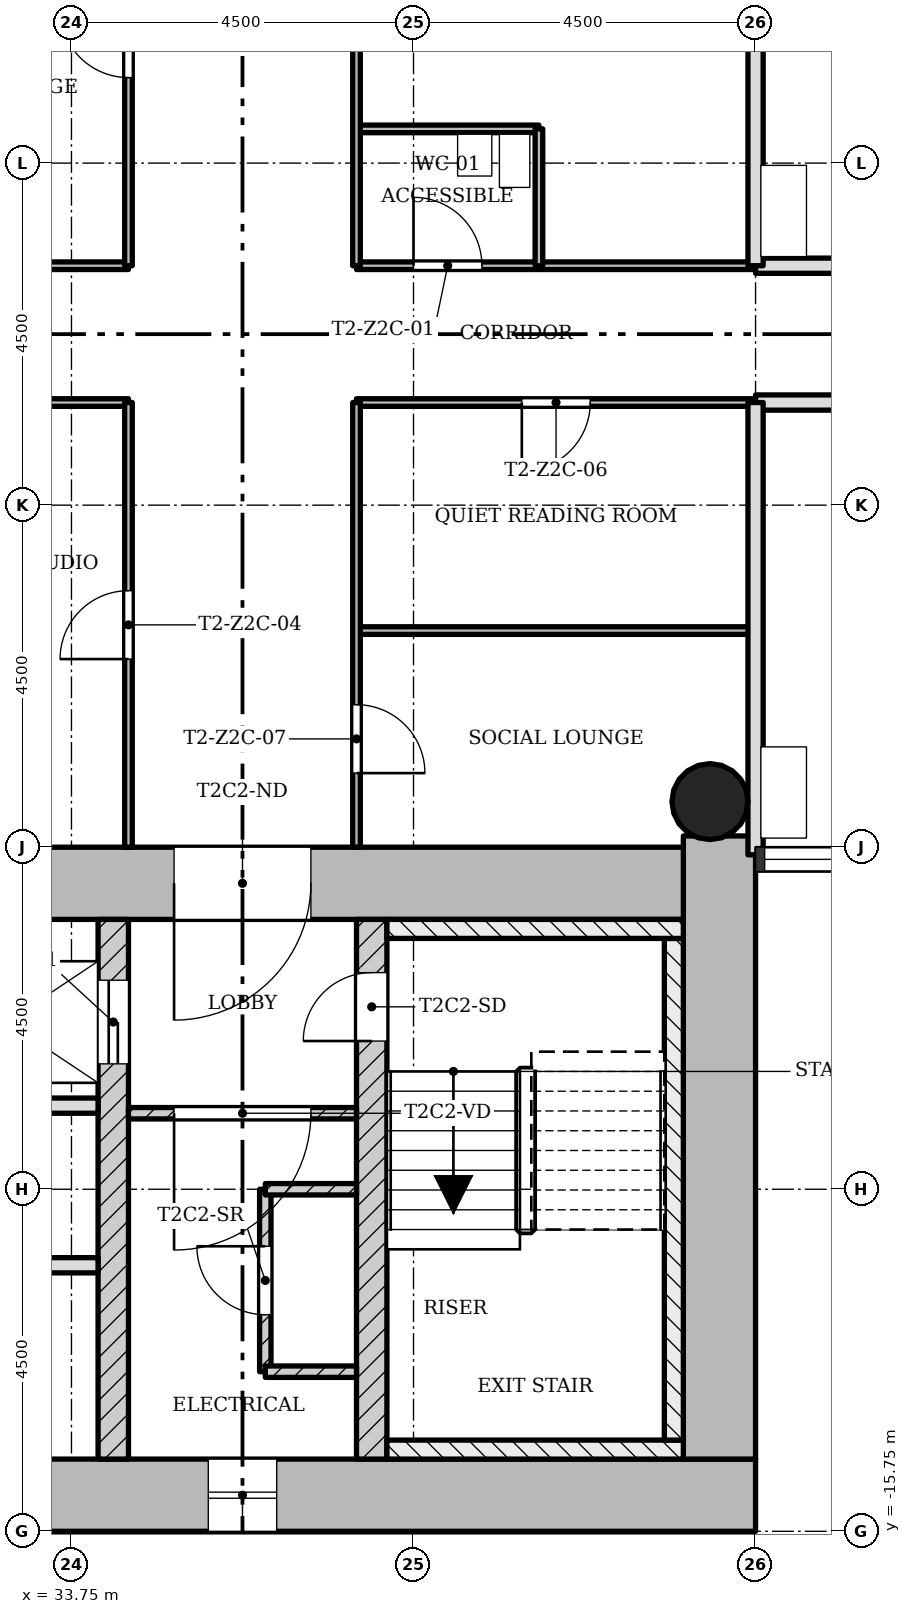
"""IFC4 building model, lengths in metres.
Left out: names, types, materials, properties, quantities, classifications, styles, units other than length and angle.
Written with IfcOpenShell. Run it as: python <this file> out.ifc"""

import sys

from ifc_helpers import new_model, si_unit, direction, frame, frame_2d, origin, origin_2d, place, context, subcontext, project, spatial, rectangle, hollow_circle, extrude, element, fill, save


model = new_model("IFC4")
c1 = context("Model", 3, precision=1e-05, world=origin(), true_north=direction((0.0, 1.0)))
c2 = subcontext(c1, "Body", "Model", "MODEL_VIEW")
j1 = project(units=[si_unit("LENGTHUNIT", "METRE"), si_unit("PLANEANGLEUNIT", "RADIAN")], contexts=[c1])
p1 = place(None, origin())
s1 = spatial("IfcSite", under=j1, at=p1, CompositionType="ELEMENT")
p2 = place(p1, origin())
s2 = spatial("IfcBuilding", under=s1, at=p2, CompositionType="ELEMENT")
p3 = place(p2, frame((0.0, 0.0, 86.8)))
s3 = spatial("IfcBuildingStorey", under=s2, at=p3, CompositionType="ELEMENT", Elevation=86.8)
p4 = place(p3, frame((30.2, -15.275, 0.0), z_axis=(0.0, 0.0, 1.0), x_axis=(1.0, 0.0, 0.0)))
e1 = element("IfcWall", 1, at=p4, inside=s3, PredefinedType="SHEAR", context=c2, shape_type="SweptSolid", body=[
    extrude(rectangle(XDim=12.55, YDim=0.95, at=frame_2d((6.275, 0.0))), origin(), (0.0, 0.0, 1.0), 3.4),
])
p5 = place(p4, frame((5.35, 0.0, 0.45)))
e2 = element("IfcOpeningElement", 2, at=p5, cuts=e1, PredefinedType="OPENING", context=c2, shape_type="SweptSolid", body=[
    extrude(rectangle(XDim=0.9, YDim=2.4, at=frame_2d((0.45, 1.2))), frame((0.0, 0.485, 0.0), z_axis=(0.0, -1.0, 0.0), x_axis=(1.0, 0.0, 0.0)), (0.0, 0.0, 1.0), 0.97),
])
p6 = place(p3, frame((42.275, -14.8, 0.0), z_axis=(0.0, 0.0, 1.0), x_axis=(0.0, 1.0, 0.0)))
e3 = element("IfcWall", 3, at=p6, inside=s3, PredefinedType="SHEAR", context=c2, shape_type="SweptSolid", body=[
    extrude(rectangle(XDim=8.198, YDim=0.95, at=frame_2d((4.099, 0.0))), origin(), (0.0, 0.0, 1.0), 3.4),
])
p7 = place(p3, frame((41.8, -7.225, 0.0), z_axis=(0.0, 0.0, 1.0), x_axis=(-1.0, 0.0, 0.0)))
e4 = element("IfcWall", 4, at=p7, inside=s3, PredefinedType="SHEAR", context=c2, shape_type="SweptSolid", body=[
    extrude(rectangle(XDim=12.55, YDim=0.95, at=frame_2d((6.275, 0.0))), origin(), (0.0, 0.0, 1.0), 3.4),
])
p8 = place(p7, frame((4.9, 0.0, 0.0)))
e5 = element("IfcOpeningElement", 5, at=p8, cuts=e4, PredefinedType="OPENING", context=c2, shape_type="SweptSolid", body=[
    extrude(rectangle(XDim=1.8, YDim=2.1, at=frame_2d((0.9, 1.05))), frame((0.0, 0.485, 0.0), z_axis=(0.0, -1.0, 0.0), x_axis=(1.0, 0.0, 0.0)), (0.0, 0.0, 1.0), 0.97),
])
p9 = place(p3, frame((34.3, -14.8, 0.0), z_axis=(0.0, 0.0, 1.0), x_axis=(0.0, 1.0, 0.0)))
e6 = element("IfcWall", 6, at=p9, inside=s3, PredefinedType="SHEAR", context=c2, shape_type="SweptSolid", body=[
    extrude(rectangle(XDim=7.1, YDim=0.4, at=frame_2d((3.55, 0.0))), origin(), (0.0, 0.0, 1.0), 3.4),
])
p10 = place(p9, frame((5.2, 0.0, 0.0)))
e7 = element("IfcOpeningElement", 7, at=p10, cuts=e6, PredefinedType="OPENING", context=c2, shape_type="SweptSolid", body=[
    extrude(rectangle(XDim=1.1, YDim=2.1, at=frame_2d((0.55, 1.05))), frame((0.0, 0.21, 0.0), z_axis=(0.0, -1.0, 0.0), x_axis=(1.0, 0.0, 0.0)), (0.0, 0.0, 1.0), 0.42),
])
p11 = place(p3, frame((37.7, -14.8, 0.0), z_axis=(0.0, 0.0, 1.0), x_axis=(0.0, 1.0, 0.0)))
e8 = element("IfcWall", 8, at=p11, inside=s3, PredefinedType="SHEAR", context=c2, shape_type="SweptSolid", body=[
    extrude(rectangle(XDim=7.1, YDim=0.4, at=frame_2d((3.55, 0.0))), origin(), (0.0, 0.0, 1.0), 3.4),
])
p12 = place(p11, frame((5.5, 0.0, 0.0)))
e9 = element("IfcOpeningElement", 9, at=p12, cuts=e8, PredefinedType="OPENING", context=c2, shape_type="SweptSolid", body=[
    extrude(rectangle(XDim=0.9, YDim=2.1, at=frame_2d((0.45, 1.05))), frame((0.0, 0.21, 0.0), z_axis=(0.0, -1.0, 0.0), x_axis=(1.0, 0.0, 0.0)), (0.0, 0.0, 1.0), 0.42),
])
p13 = place(p3, frame((42.15, -6.15, 0.0), z_axis=(0.0, 0.0, 1.0), x_axis=(1.0, 0.0, 0.0)))
e10 = element("IfcColumn", 10, at=p13, inside=s3, PredefinedType="COLUMN", context=c2, shape_type="SweptSolid", body=[
    extrude(hollow_circle(Radius=0.5, WallThickness=0.036, at=origin_2d()), origin(), (0.0, 0.0, 1.0), 3.4),
])
p14 = place(p3, frame((34.5, -10.25, 0.0), z_axis=(0.0, 0.0, 1.0), x_axis=(1.0, 0.0, 0.0)))
e11 = element("IfcWall", 11, at=p14, inside=s3, PredefinedType="PARTITIONING", context=c2, shape_type="SweptSolid", body=[
    extrude(rectangle(XDim=3.0, YDim=0.15, at=frame_2d((1.5, 0.0))), origin(), (0.0, 0.0, 1.0), 3.0),
])
p15 = place(p14, frame((0.6, 0.0, 0.0)))
e12 = element("IfcOpeningElement", 12, at=p15, cuts=e11, PredefinedType="OPENING", context=c2, shape_type="SweptSolid", body=[
    extrude(rectangle(XDim=1.8, YDim=2.1, at=frame_2d((0.9, 1.05))), frame((0.0, 0.085, 0.0), z_axis=(0.0, -1.0, 0.0), x_axis=(1.0, 0.0, 0.0)), (0.0, 0.0, 1.0), 0.17),
])
for number, where, z_axis, x_axis in (
    (13, (30.2, -10.15, 0.0), (0.0, 0.0, 1.0), (1.0, 0.0, 0.0)),
    (14, (30.2, -12.25, 0.0), (0.0, 0.0, 1.0), (1.0, 0.0, 0.0)),
):
    element("IfcWall", number, at=place(p3, frame(where, z_axis=z_axis, x_axis=x_axis)), inside=s3, PredefinedType="SOLIDWALL", context=c2, shape_type="SweptSolid", body=[
        extrude(rectangle(XDim=3.9, YDim=0.2, at=frame_2d((1.95, 0.0))), origin(), (0.0, 0.0, 1.0), 3.0),
    ])
p16 = place(p3, frame((36.3, -11.25, 0.0), z_axis=(0.0, 0.0, 1.0), x_axis=(0.0, -1.0, 0.0)))
e15 = element("IfcWall", 15, at=p16, inside=s3, PredefinedType="PARTITIONING", context=c2, shape_type="SweptSolid", body=[
    extrude(rectangle(XDim=2.4, YDim=0.15, at=frame_2d((1.2, 0.0))), origin(), (0.0, 0.0, 1.0), 3.0),
])
p17 = place(p16, frame((0.75, 0.0, 0.0)))
e16 = element("IfcOpeningElement", 16, at=p17, cuts=e15, PredefinedType="OPENING", context=c2, shape_type="SweptSolid", body=[
    extrude(rectangle(XDim=0.9, YDim=2.1, at=frame_2d((0.45, 1.05))), frame((0.0, 0.085, 0.0), z_axis=(0.0, -1.0, 0.0), x_axis=(1.0, 0.0, 0.0)), (0.0, 0.0, 1.0), 0.17),
])
for number, where, z_axis, x_axis in (
    (17, (36.3, -11.25, 0.0), (0.0, 0.0, 1.0), (1.0, 0.0, 0.0)),
    (18, (36.3, -13.65, 0.0), (0.0, 0.0, 1.0), (1.0, 0.0, 0.0)),
):
    element("IfcWall", number, at=place(p3, frame(where, z_axis=z_axis, x_axis=x_axis)), inside=s3, PredefinedType="PARTITIONING", context=c2, shape_type="SweptSolid", body=[
        extrude(rectangle(XDim=1.2, YDim=0.15, at=frame_2d((0.6, 0.0))), origin(), (0.0, 0.0, 1.0), 3.0),
    ])
p18 = place(p3, frame((42.75, -3.9, 0.0), z_axis=(0.0, 0.0, 1.0), x_axis=(-1.0, 0.0, 0.0)))
e19 = element("IfcWall", 19, at=p18, inside=s3, PredefinedType="PARTITIONING", context=c2, shape_type="SweptSolid", body=[
    extrude(rectangle(XDim=5.25, YDim=0.1, at=frame_2d((2.625, 0.0))), origin(), (0.0, 0.0, 1.0), 3.0),
])
p19 = place(p3, frame((42.75, -0.9, 0.0), z_axis=(0.0, 0.0, 1.0), x_axis=(-1.0, 0.0, 0.0)))
e20 = element("IfcWall", 20, at=p19, inside=s3, PredefinedType="PARTITIONING", context=c2, shape_type="SweptSolid", body=[
    extrude(rectangle(XDim=5.25, YDim=0.1, at=frame_2d((2.625, 0.0))), origin(), (0.0, 0.0, 1.0), 3.0),
])
p20 = place(p19, frame((2.175, 0.0, 0.0)))
e21 = element("IfcOpeningElement", 21, at=p20, cuts=e20, PredefinedType="OPENING", context=c2, shape_type="SweptSolid", body=[
    extrude(rectangle(XDim=0.9, YDim=2.1, at=frame_2d((0.45, 1.05))), frame((0.0, 0.06, 0.0), z_axis=(0.0, -1.0, 0.0), x_axis=(1.0, 0.0, 0.0)), (0.0, 0.0, 1.0), 0.12),
])
p21 = place(p3, frame((34.5, -0.9, 0.0), z_axis=(0.0, 0.0, 1.0), x_axis=(-1.0, 0.0, 0.0)))
e22 = element("IfcWall", 22, at=p21, inside=s3, PredefinedType="PARTITIONING", context=c2, shape_type="SweptSolid", body=[
    extrude(rectangle(XDim=5.25, YDim=0.1, at=frame_2d((2.625, 0.0))), origin(), (0.0, 0.0, 1.0), 3.0),
])
p22 = place(p21, frame((3.525, 0.0, 0.0)))
e23 = element("IfcOpeningElement", 23, at=p22, cuts=e22, PredefinedType="OPENING", context=c2, shape_type="SweptSolid", body=[
    extrude(rectangle(XDim=0.9, YDim=2.1, at=frame_2d((0.45, 1.05))), frame((0.0, 0.06, 0.0), z_axis=(0.0, -1.0, 0.0), x_axis=(1.0, 0.0, 0.0)), (0.0, 0.0, 1.0), 0.12),
])
p23 = place(p3, frame((51.75, -0.9, 0.0), z_axis=(0.0, 0.0, 1.0), x_axis=(-1.0, 0.0, 0.0)))
e24 = element("IfcWall", 24, at=p23, inside=s3, PredefinedType="SOLIDWALL", context=c2, shape_type="SweptSolid", body=[
    extrude(rectangle(XDim=9.0, YDim=0.2, at=frame_2d((4.5, 0.0))), origin(), (0.0, 0.0, 1.0), 3.0),
])
p24 = place(p23, frame((1.95, 0.0, 0.0)))
e25 = element("IfcOpeningElement", 25, at=p24, cuts=e24, PredefinedType="OPENING", context=c2, shape_type="SweptSolid", body=[
    extrude(rectangle(XDim=0.9, YDim=2.1, at=frame_2d((0.45, 1.05))), frame((0.0, 0.11, 0.0), z_axis=(0.0, -1.0, 0.0), x_axis=(1.0, 0.0, 0.0)), (0.0, 0.0, 1.0), 0.22),
])
p25 = place(p3, frame((42.75, 0.9, 0.0), z_axis=(0.0, 0.0, 1.0), x_axis=(-1.0, 0.0, 0.0)))
e26 = element("IfcWall", 26, at=p25, inside=s3, PredefinedType="PARTITIONING", context=c2, shape_type="SweptSolid", body=[
    extrude(rectangle(XDim=5.25, YDim=0.1, at=frame_2d((2.625, 0.0))), origin(), (0.0, 0.0, 1.0), 3.0),
])
p26 = place(p25, frame((3.6, 0.0, 0.0)))
e27 = element("IfcOpeningElement", 27, at=p26, cuts=e26, PredefinedType="OPENING", context=c2, shape_type="SweptSolid", body=[
    extrude(rectangle(XDim=0.9, YDim=2.1, at=frame_2d((0.45, 1.05))), frame((0.0, 0.06, 0.0), z_axis=(0.0, -1.0, 0.0), x_axis=(1.0, 0.0, 0.0)), (0.0, 0.0, 1.0), 0.12),
])
p27 = place(p3, frame((34.5, 0.9, 0.0), z_axis=(0.0, 0.0, 1.0), x_axis=(-1.0, 0.0, 0.0)))
e28 = element("IfcWall", 28, at=p27, inside=s3, PredefinedType="PARTITIONING", context=c2, shape_type="SweptSolid", body=[
    extrude(rectangle(XDim=5.25, YDim=0.1, at=frame_2d((2.625, 0.0))), origin(), (0.0, 0.0, 1.0), 3.0),
])
p28 = place(p27, frame((3.225, 0.0, 0.0)))
e29 = element("IfcOpeningElement", 29, at=p28, cuts=e28, PredefinedType="OPENING", context=c2, shape_type="SweptSolid", body=[
    extrude(rectangle(XDim=0.9, YDim=2.1, at=frame_2d((0.45, 1.05))), frame((0.0, 0.06, 0.0), z_axis=(0.0, -1.0, 0.0), x_axis=(1.0, 0.0, 0.0)), (0.0, 0.0, 1.0), 0.12),
])
p29 = place(p3, frame((51.75, 0.9, 0.0), z_axis=(0.0, 0.0, 1.0), x_axis=(-1.0, 0.0, 0.0)))
e30 = element("IfcWall", 30, at=p29, inside=s3, PredefinedType="SOLIDWALL", context=c2, shape_type="SweptSolid", body=[
    extrude(rectangle(XDim=9.0, YDim=0.2, at=frame_2d((4.5, 0.0))), origin(), (0.0, 0.0, 1.0), 3.0),
])
p30 = place(p29, frame((1.95, 0.0, 0.0)))
e31 = element("IfcOpeningElement", 31, at=p30, cuts=e30, PredefinedType="OPENING", context=c2, shape_type="SweptSolid", body=[
    extrude(rectangle(XDim=0.9, YDim=2.1, at=frame_2d((0.45, 1.05))), frame((0.0, 0.11, 0.0), z_axis=(0.0, -1.0, 0.0), x_axis=(1.0, 0.0, 0.0)), (0.0, 0.0, 1.0), 0.22),
])
p31 = place(p3, frame((39.9, 2.7, 0.0), z_axis=(0.0, 0.0, 1.0), x_axis=(-1.0, 0.0, 0.0)))
e32 = element("IfcWall", 32, at=p31, inside=s3, PredefinedType="PARTITIONING", context=c2, shape_type="SweptSolid", body=[
    extrude(rectangle(XDim=2.4, YDim=0.1, at=frame_2d((1.2, 0.0))), origin(), (0.0, 0.0, 1.0), 3.0),
])
for number, where, z_axis, x_axis in (
    (33, (42.75, -6.85, 0.0), (0.0, 0.0, 1.0), (0.0, 1.0, 0.0)),
    (34, (42.75, 0.9, 0.0), (0.0, 0.0, 1.0), (0.0, 1.0, 0.0)),
):
    element("IfcWall", number, at=place(p3, frame(where, z_axis=z_axis, x_axis=x_axis)), inside=s3, PredefinedType="SOLIDWALL", context=c2, shape_type="SweptSolid", body=[
        extrude(rectangle(XDim=5.95, YDim=0.2, at=frame_2d((2.975, 0.0))), origin(), (0.0, 0.0, 1.0), 3.0),
    ])
p32 = place(p3, frame((39.9, 0.9, 0.0), z_axis=(0.0, 0.0, 1.0), x_axis=(0.0, 1.0, 0.0)))
e35 = element("IfcWall", 35, at=p32, inside=s3, PredefinedType="PARTITIONING", context=c2, shape_type="SweptSolid", body=[
    extrude(rectangle(XDim=1.8, YDim=0.1, at=frame_2d((0.9, 0.0))), origin(), (0.0, 0.0, 1.0), 3.0),
])
p33 = place(p3, frame((37.5, -6.75, 0.0), z_axis=(0.0, 0.0, 1.0), x_axis=(0.0, 1.0, 0.0)))
e36 = element("IfcWall", 36, at=p33, inside=s3, PredefinedType="PARTITIONING", context=c2, shape_type="SweptSolid", body=[
    extrude(rectangle(XDim=5.85, YDim=0.1, at=frame_2d((2.925, 0.0))), origin(), (0.0, 0.0, 1.0), 3.0),
])
p34 = place(p33, frame((0.975, 0.0, 0.0)))
e37 = element("IfcOpeningElement", 37, at=p34, cuts=e36, PredefinedType="OPENING", context=c2, shape_type="SweptSolid", body=[
    extrude(rectangle(XDim=0.9, YDim=2.1, at=frame_2d((0.45, 1.05))), frame((0.0, 0.06, 0.0), z_axis=(0.0, -1.0, 0.0), x_axis=(1.0, 0.0, 0.0)), (0.0, 0.0, 1.0), 0.12),
])
p35 = place(p3, frame((37.5, 0.9, 0.0), z_axis=(0.0, 0.0, 1.0), x_axis=(0.0, 1.0, 0.0)))
e38 = element("IfcWall", 38, at=p35, inside=s3, PredefinedType="PARTITIONING", context=c2, shape_type="SweptSolid", body=[
    extrude(rectangle(XDim=5.85, YDim=0.1, at=frame_2d((2.925, 0.0))), origin(), (0.0, 0.0, 1.0), 3.0),
])
p36 = place(p35, frame((3.375, 0.0, 0.0)))
e39 = element("IfcOpeningElement", 39, at=p36, cuts=e38, PredefinedType="OPENING", context=c2, shape_type="SweptSolid", body=[
    extrude(rectangle(XDim=0.9, YDim=2.1, at=frame_2d((0.45, 1.05))), frame((0.0, 0.06, 0.0), z_axis=(0.0, -1.0, 0.0), x_axis=(1.0, 0.0, 0.0)), (0.0, 0.0, 1.0), 0.12),
])
p37 = place(p3, frame((34.5, -6.75, 0.0), z_axis=(0.0, 0.0, 1.0), x_axis=(0.0, 1.0, 0.0)))
e40 = element("IfcWall", 40, at=p37, inside=s3, PredefinedType="PARTITIONING", context=c2, shape_type="SweptSolid", body=[
    extrude(rectangle(XDim=5.85, YDim=0.1, at=frame_2d((2.925, 0.0))), origin(), (0.0, 0.0, 1.0), 3.0),
])
p38 = place(p37, frame((2.475, 0.0, 0.0)))
e41 = element("IfcOpeningElement", 41, at=p38, cuts=e40, PredefinedType="OPENING", context=c2, shape_type="SweptSolid", body=[
    extrude(rectangle(XDim=0.9, YDim=2.1, at=frame_2d((0.45, 1.05))), frame((0.0, 0.06, 0.0), z_axis=(0.0, -1.0, 0.0), x_axis=(1.0, 0.0, 0.0)), (0.0, 0.0, 1.0), 0.12),
])
p39 = place(p3, frame((34.5, 0.9, 0.0), z_axis=(0.0, 0.0, 1.0), x_axis=(0.0, 1.0, 0.0)))
e42 = element("IfcWall", 42, at=p39, inside=s3, PredefinedType="PARTITIONING", context=c2, shape_type="SweptSolid", body=[
    extrude(rectangle(XDim=5.85, YDim=0.1, at=frame_2d((2.925, 0.0))), origin(), (0.0, 0.0, 1.0), 3.0),
])
p40 = place(p39, frame((2.475, 0.0, 0.0)))
e43 = element("IfcOpeningElement", 43, at=p40, cuts=e42, PredefinedType="OPENING", context=c2, shape_type="SweptSolid", body=[
    extrude(rectangle(XDim=0.9, YDim=2.1, at=frame_2d((0.45, 1.05))), frame((0.0, 0.06, 0.0), z_axis=(0.0, -1.0, 0.0), x_axis=(1.0, 0.0, 0.0)), (0.0, 0.0, 1.0), 0.12),
])
p41 = place(p3, frame((37.9, -14.675, 0.0), z_axis=(0.0, 0.0, 1.0), x_axis=(1.0, 0.0, 0.0)))
e44 = element("IfcWall", 44, at=p41, inside=s3, PredefinedType="SHEAR", context=c2, shape_type="SweptSolid", body=[
    extrude(rectangle(XDim=3.9, YDim=0.25, at=frame_2d((1.95, 0.0))), origin(), (0.0, 0.0, 1.0), 3.4),
])
p42 = place(p3, frame((41.675, -7.95, 0.0), z_axis=(0.0, 0.0, 1.0), x_axis=(0.0, -1.0, 0.0)))
e45 = element("IfcWall", 45, at=p42, inside=s3, PredefinedType="SHEAR", context=c2, shape_type="SweptSolid", body=[
    extrude(rectangle(XDim=6.6, YDim=0.25, at=frame_2d((3.3, 0.0))), origin(), (0.0, 0.0, 1.0), 3.4),
])
p43 = place(p3, frame((37.9, -7.825, 0.0), z_axis=(0.0, 0.0, 1.0), x_axis=(1.0, 0.0, 0.0)))
e46 = element("IfcWall", 46, at=p43, inside=s3, PredefinedType="SHEAR", context=c2, shape_type="SweptSolid", body=[
    extrude(rectangle(XDim=3.9, YDim=0.25, at=frame_2d((1.95, 0.0))), origin(), (0.0, 0.0, 1.0), 3.4),
])
p44 = place(p5, origin())
e47 = element("IfcWindow", 47, at=p44, inside=s3, PartitioningType="SINGLE_PANEL", PredefinedType="WINDOW", context=c2, shape_type="SweptSolid", body=[
    extrude(rectangle(XDim=0.9, YDim=2.4, at=frame_2d((0.45, 1.2))), frame((0.0, 0.03, 0.0), z_axis=(0.0, -1.0, 0.0), x_axis=(1.0, 0.0, 0.0)), (0.0, 0.0, 1.0), 0.06),
])
fill(e2, e47)
p45 = place(p15, origin())
e48 = element("IfcDoor", 48, at=p45, inside=s3, OperationType="SINGLE_SWING_LEFT", PredefinedType="DOOR", context=c2, shape_type="SweptSolid", body=[
    extrude(rectangle(XDim=1.8, YDim=2.1, at=frame_2d((0.9, 1.05))), frame((0.0, 0.025, 0.0), z_axis=(0.0, -1.0, 0.0), x_axis=(1.0, 0.0, 0.0)), (0.0, 0.0, 1.0), 0.05),
])
fill(e12, e48)
p46 = place(p17, origin())
e49 = element("IfcDoor", 49, at=p46, inside=s3, OperationType="SINGLE_SWING_LEFT", PredefinedType="DOOR", context=c2, shape_type="SweptSolid", body=[
    extrude(rectangle(XDim=0.9, YDim=2.1, at=frame_2d((0.45, 1.05))), frame((0.0, 0.025, 0.0), z_axis=(0.0, -1.0, 0.0), x_axis=(1.0, 0.0, 0.0)), (0.0, 0.0, 1.0), 0.05),
])
fill(e16, e49)
p47 = place(p26, origin())
e50 = element("IfcDoor", 50, at=p47, inside=s3, OperationType="SINGLE_SWING_RIGHT", PredefinedType="DOOR", context=c2, shape_type="SweptSolid", body=[
    extrude(rectangle(XDim=0.9, YDim=2.1, at=frame_2d((0.45, 1.05))), frame((0.0, 0.025, 0.0), z_axis=(0.0, -1.0, 0.0), x_axis=(1.0, 0.0, 0.0)), (0.0, 0.0, 1.0), 0.05),
])
fill(e27, e50)
p48 = place(p40, origin())
e51 = element("IfcDoor", 51, at=p48, inside=s3, OperationType="SINGLE_SWING_LEFT", PredefinedType="DOOR", context=c2, shape_type="SweptSolid", body=[
    extrude(rectangle(XDim=0.9, YDim=2.1, at=frame_2d((0.45, 1.05))), frame((0.0, 0.025, 0.0), z_axis=(0.0, -1.0, 0.0), x_axis=(1.0, 0.0, 0.0)), (0.0, 0.0, 1.0), 0.05),
])
fill(e43, e51)
p49 = place(p38, origin())
e52 = element("IfcDoor", 52, at=p49, inside=s3, OperationType="SINGLE_SWING_RIGHT", PredefinedType="DOOR", context=c2, shape_type="SweptSolid", body=[
    extrude(rectangle(XDim=0.9, YDim=2.1, at=frame_2d((0.45, 1.05))), frame((0.0, 0.025, 0.0), z_axis=(0.0, -1.0, 0.0), x_axis=(1.0, 0.0, 0.0)), (0.0, 0.0, 1.0), 0.05),
])
fill(e41, e52)
p50 = place(p20, origin())
e53 = element("IfcDoor", 53, at=p50, inside=s3, OperationType="SINGLE_SWING_LEFT", PredefinedType="DOOR", context=c2, shape_type="SweptSolid", body=[
    extrude(rectangle(XDim=0.9, YDim=2.1, at=frame_2d((0.45, 1.05))), frame((0.0, 0.025, 0.0), z_axis=(0.0, -1.0, 0.0), x_axis=(1.0, 0.0, 0.0)), (0.0, 0.0, 1.0), 0.05),
])
fill(e21, e53)
p51 = place(p34, origin())
e54 = element("IfcDoor", 54, at=p51, inside=s3, OperationType="SINGLE_SWING_LEFT", PredefinedType="DOOR", context=c2, shape_type="SweptSolid", body=[
    extrude(rectangle(XDim=0.9, YDim=2.1, at=frame_2d((0.45, 1.05))), frame((0.0, 0.025, 0.0), z_axis=(0.0, -1.0, 0.0), x_axis=(1.0, 0.0, 0.0)), (0.0, 0.0, 1.0), 0.05),
])
fill(e37, e54)
p52 = place(p12, origin())
e55 = element("IfcDoor", 55, at=p52, inside=s3, OperationType="SINGLE_SWING_RIGHT", PredefinedType="DOOR", context=c2, shape_type="SweptSolid", body=[
    extrude(rectangle(XDim=0.9, YDim=2.1, at=frame_2d((0.45, 1.05))), frame((0.0, 0.025, 0.0), z_axis=(0.0, -1.0, 0.0), x_axis=(1.0, 0.0, 0.0)), (0.0, 0.0, 1.0), 0.05),
])
fill(e9, e55)
p53 = place(p10, origin())
e56 = element("IfcDoor", 56, at=p53, inside=s3, OperationType="SLIDING_TO_LEFT", PredefinedType="DOOR", context=c2, shape_type="SweptSolid", body=[
    extrude(rectangle(XDim=1.1, YDim=2.1, at=frame_2d((0.55, 1.05))), frame((0.0, 0.025, 0.0), z_axis=(0.0, -1.0, 0.0), x_axis=(1.0, 0.0, 0.0)), (0.0, 0.0, 1.0), 0.05),
])
fill(e7, e56)
p54 = place(p8, origin())
e57 = element("IfcDoor", 57, at=p54, inside=s3, OperationType="SINGLE_SWING_LEFT", PredefinedType="DOOR", context=c2, shape_type="SweptSolid", body=[
    extrude(rectangle(XDim=1.8, YDim=2.1, at=frame_2d((0.9, 1.05))), frame((0.0, 0.025, 0.0), z_axis=(0.0, -1.0, 0.0), x_axis=(1.0, 0.0, 0.0)), (0.0, 0.0, 1.0), 0.05),
])
fill(e5, e57)
save(model, sys.argv[1])
